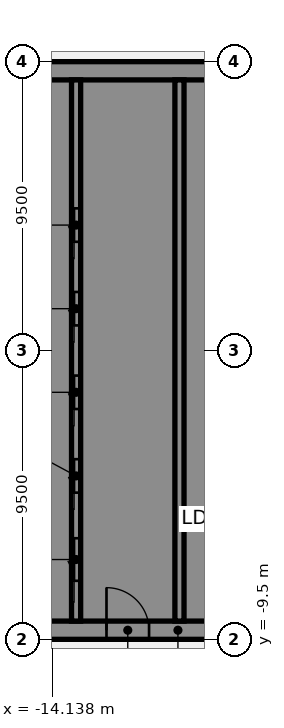
"""IFC4 building model, lengths in metres.
Left out: names, types, materials, properties, quantities, classifications, styles, units other than length and angle.
Written with IfcOpenShell. Run it as: python <this file> out.ifc"""

import sys

from ifc_helpers import new_model, si_unit, direction, frame, frame_2d, origin, place, context, subcontext, project, spatial, polyline, rectangle, outline, extrude, element, fill, save


model = new_model("IFC4")
c1 = context("Model", 3, precision=1e-05, world=origin(), true_north=direction((0.0, 1.0)))
c2 = subcontext(c1, "Body", "Model", "MODEL_VIEW")
j1 = project(units=[si_unit("LENGTHUNIT", "METRE"), si_unit("PLANEANGLEUNIT", "RADIAN")], contexts=[c1])
p1 = place(None, origin())
s1 = spatial("IfcSite", under=j1, at=p1, CompositionType="ELEMENT")
p2 = place(p1, origin())
s2 = spatial("IfcBuilding", under=s1, at=p2, CompositionType="ELEMENT")
p3 = place(p2, frame((0.0, 0.0, 106.0)))
s3 = spatial("IfcBuildingStorey", under=s2, at=p3, CompositionType="ELEMENT", Elevation=106.0)
p4 = place(p3, frame((-16.5, -9.2, 0.0), z_axis=(0.0, 0.0, 1.0), x_axis=(1.0, 0.0, 0.0)))
e1 = element("IfcWall", 1, at=p4, inside=s3, PredefinedType="SHEAR", context=c2, shape_type="SweptSolid", body=[
    extrude(rectangle(XDim=13.0, YDim=0.6, at=frame_2d((6.5, 0.0))), origin(), (0.0, 0.0, 1.0), 3.61),
])
p5 = place(p4, frame((4.15, 0.0, 0.0)))
e2 = element("IfcOpeningElement", 2, at=p5, cuts=e1, PredefinedType="OPENING", context=c2, shape_type="SweptSolid", body=[
    extrude(rectangle(XDim=1.4, YDim=2.1, at=frame_2d((0.7, 1.05))), frame((0.0, 0.31, 0.0), z_axis=(0.0, -1.0, 0.0), x_axis=(1.0, 0.0, 0.0)), (0.0, 0.0, 1.0), 0.62),
])
p6 = place(p4, frame((10.125, 0.0, 0.0)))
e3 = element("IfcOpeningElement", 3, at=p6, cuts=e1, PredefinedType="OPENING", context=c2, shape_type="SweptSolid", body=[
    extrude(rectangle(XDim=1.4, YDim=2.1, at=frame_2d((0.7, 1.05))), frame((0.0, 0.31, 0.0), z_axis=(0.0, -1.0, 0.0), x_axis=(1.0, 0.0, 0.0)), (0.0, 0.0, 1.0), 0.62),
])
p7 = place(p3, origin())
e4 = element("IfcWall", 4, at=p7, inside=s3, PredefinedType="SHEAR", context=c2, shape_type="SweptSolid", body=[
    extrude(outline(polyline([(-13.5, -8.9), (-13.5, -8.125), (-15.9, -8.125), (-15.9, -5.625), (-13.5, -5.625), (-13.5, -5.375), (-15.9, -5.375), (-15.9, -2.875), (-13.5, -2.875), (-13.5, -2.625), (-15.9, -2.625), (-15.9, -0.125), (-13.5, -0.125), (-13.5, 0.125), (-15.9, 0.125), (-15.9, 2.625), (-13.5, 2.625), (-13.5, 2.875), (-15.9, 2.875), (-15.9, 5.375), (-13.5, 5.375), (-13.5, 5.625), (-15.9, 5.625), (-15.9, 8.125), (-13.5, 8.125), (-13.5, 8.9), (-15.9, 8.9), (-16.5, 8.9), (-16.5, -8.9), (-15.9, -8.9), (-13.5, -8.9)])), origin(), (0.0, 0.0, 1.0), 3.61),
])
p8 = place(p3, frame((-16.5, 9.2, 0.0), z_axis=(0.0, 0.0, 1.0), x_axis=(1.0, 0.0, 0.0)))
e5 = element("IfcWall", 5, at=p8, inside=s3, PredefinedType="SHEAR", context=c2, shape_type="SweptSolid", body=[
    extrude(rectangle(XDim=13.0, YDim=0.6, at=frame_2d((6.5, 0.0))), origin(), (0.0, 0.0, 1.0), 3.61),
])
p9 = place(p3, origin())
e6 = element("IfcWall", 6, at=p9, inside=s3, PredefinedType="SHEAR", context=c2, shape_type="SweptSolid", body=[
    extrude(outline(polyline([(-9.8, -5.375), (-9.8, -5.625), (-7.5, -5.625), (-7.2, -5.625), (-7.2, 8.9), (-7.5, 8.9), (-9.8, 8.9), (-9.8, 8.125), (-7.5, 8.125), (-7.5, 5.625), (-9.8, 5.625), (-9.8, 5.375), (-7.5, 5.375), (-7.5, 2.875), (-9.8, 2.875), (-9.8, 2.625), (-7.5, 2.625), (-7.5, 0.125), (-9.8, 0.125), (-9.8, -0.125), (-7.5, -0.125), (-7.5, -2.625), (-9.8, -2.625), (-9.8, -2.875), (-7.5, -2.875), (-7.5, -5.375), (-9.8, -5.375)])), origin(), (0.0, 0.0, 1.0), 3.61),
])
p10 = place(p3, origin())
e7 = element("IfcWall", 7, at=p10, inside=s3, PredefinedType="SHEAR", context=c2, shape_type="SweptSolid", body=[
    extrude(outline(polyline([(-7.5, -8.125), (-9.55, -8.125), (-9.55, -5.625), (-9.8, -5.625), (-9.8, -8.125), (-9.8, -8.9), (-7.5, -8.9), (-7.5, -8.125)])), origin(), (0.0, 0.0, 1.0), 3.61),
])
p11 = place(p3, frame((-13.35, -8.9, 0.0), z_axis=(0.0, 0.0, 1.0), x_axis=(0.0, 1.0, 0.0)))
e8 = element("IfcWall", 8, at=p11, inside=s3, PredefinedType="SHEAR", context=c2, shape_type="SweptSolid", body=[
    extrude(rectangle(XDim=17.8, YDim=0.3, at=frame_2d((8.9, 0.0))), origin(), (0.0, 0.0, 1.0), 3.61),
])
p12 = place(p11, frame((1.325, 0.0, 0.0)))
e9 = element("IfcOpeningElement", 9, at=p12, cuts=e8, PredefinedType="OPENING", context=c2, shape_type="SweptSolid", body=[
    extrude(rectangle(XDim=1.4, YDim=2.1, at=frame_2d((0.7, 1.05))), frame((0.0, 0.16, 0.0), z_axis=(0.0, -1.0, 0.0), x_axis=(1.0, 0.0, 0.0)), (0.0, 0.0, 1.0), 0.32),
])
p13 = place(p11, frame((4.225, 0.0, 0.0)))
e10 = element("IfcOpeningElement", 10, at=p13, cuts=e8, PredefinedType="OPENING", context=c2, shape_type="SweptSolid", body=[
    extrude(rectangle(XDim=1.1, YDim=2.1, at=frame_2d((0.55, 1.05))), frame((0.0, 0.16, 0.0), z_axis=(0.0, -1.0, 0.0), x_axis=(1.0, 0.0, 0.0)), (0.0, 0.0, 1.0), 0.32),
])
p14 = place(p11, frame((6.975, 0.0, 0.0)))
e11 = element("IfcOpeningElement", 11, at=p14, cuts=e8, PredefinedType="OPENING", context=c2, shape_type="SweptSolid", body=[
    extrude(rectangle(XDim=1.1, YDim=2.1, at=frame_2d((0.55, 1.05))), frame((0.0, 0.16, 0.0), z_axis=(0.0, -1.0, 0.0), x_axis=(1.0, 0.0, 0.0)), (0.0, 0.0, 1.0), 0.32),
])
p15 = place(p11, frame((9.725, 0.0, 0.0)))
e12 = element("IfcOpeningElement", 12, at=p15, cuts=e8, PredefinedType="OPENING", context=c2, shape_type="SweptSolid", body=[
    extrude(rectangle(XDim=1.1, YDim=2.1, at=frame_2d((0.55, 1.05))), frame((0.0, 0.16, 0.0), z_axis=(0.0, -1.0, 0.0), x_axis=(1.0, 0.0, 0.0)), (0.0, 0.0, 1.0), 0.32),
])
p16 = place(p11, frame((12.475, 0.0, 0.0)))
e13 = element("IfcOpeningElement", 13, at=p16, cuts=e8, PredefinedType="OPENING", context=c2, shape_type="SweptSolid", body=[
    extrude(rectangle(XDim=1.1, YDim=2.1, at=frame_2d((0.55, 1.05))), frame((0.0, 0.16, 0.0), z_axis=(0.0, -1.0, 0.0), x_axis=(1.0, 0.0, 0.0)), (0.0, 0.0, 1.0), 0.32),
])
p17 = place(p3, frame((-9.95, -8.9, 0.0), z_axis=(0.0, 0.0, 1.0), x_axis=(0.0, 1.0, 0.0)))
e14 = element("IfcWall", 14, at=p17, inside=s3, PredefinedType="SHEAR", context=c2, shape_type="SweptSolid", body=[
    extrude(rectangle(XDim=17.8, YDim=0.3, at=frame_2d((8.9, 0.0))), origin(), (0.0, 0.0, 1.0), 3.61),
])
p18 = place(p5, origin())
e15 = element("IfcDoor", 15, at=p18, inside=s3, OperationType="SINGLE_SWING_LEFT", PredefinedType="DOOR", context=c2, shape_type="SweptSolid", body=[
    extrude(rectangle(XDim=1.4, YDim=2.1, at=frame_2d((0.7, 1.05))), frame((0.0, 0.025, 0.0), z_axis=(0.0, -1.0, 0.0), x_axis=(1.0, 0.0, 0.0)), (0.0, 0.0, 1.0), 0.05),
])
fill(e2, e15)
p19 = place(p12, origin())
e16 = element("IfcDoor", 16, at=p19, inside=s3, OperationType="SLIDING_TO_LEFT", PredefinedType="DOOR", context=c2, shape_type="SweptSolid", body=[
    extrude(rectangle(XDim=1.4, YDim=2.1, at=frame_2d((0.7, 1.05))), frame((0.0, 0.025, 0.0), z_axis=(0.0, -1.0, 0.0), x_axis=(1.0, 0.0, 0.0)), (0.0, 0.0, 1.0), 0.05),
])
fill(e9, e16)
p20 = place(p13, origin())
e17 = element("IfcDoor", 17, at=p20, inside=s3, OperationType="SLIDING_TO_LEFT", PredefinedType="DOOR", context=c2, shape_type="SweptSolid", body=[
    extrude(rectangle(XDim=1.1, YDim=2.1, at=frame_2d((0.55, 1.05))), frame((0.0, 0.025, 0.0), z_axis=(0.0, -1.0, 0.0), x_axis=(1.0, 0.0, 0.0)), (0.0, 0.0, 1.0), 0.05),
])
fill(e10, e17)
p21 = place(p14, origin())
e18 = element("IfcDoor", 18, at=p21, inside=s3, OperationType="SLIDING_TO_LEFT", PredefinedType="DOOR", context=c2, shape_type="SweptSolid", body=[
    extrude(rectangle(XDim=1.1, YDim=2.1, at=frame_2d((0.55, 1.05))), frame((0.0, 0.025, 0.0), z_axis=(0.0, -1.0, 0.0), x_axis=(1.0, 0.0, 0.0)), (0.0, 0.0, 1.0), 0.05),
])
fill(e11, e18)
p22 = place(p15, origin())
e19 = element("IfcDoor", 19, at=p22, inside=s3, OperationType="SLIDING_TO_LEFT", PredefinedType="DOOR", context=c2, shape_type="SweptSolid", body=[
    extrude(rectangle(XDim=1.1, YDim=2.1, at=frame_2d((0.55, 1.05))), frame((0.0, 0.025, 0.0), z_axis=(0.0, -1.0, 0.0), x_axis=(1.0, 0.0, 0.0)), (0.0, 0.0, 1.0), 0.05),
])
fill(e12, e19)
p23 = place(p16, origin())
e20 = element("IfcDoor", 20, at=p23, inside=s3, OperationType="SLIDING_TO_LEFT", PredefinedType="DOOR", context=c2, shape_type="SweptSolid", body=[
    extrude(rectangle(XDim=1.1, YDim=2.1, at=frame_2d((0.55, 1.05))), frame((0.0, 0.025, 0.0), z_axis=(0.0, -1.0, 0.0), x_axis=(1.0, 0.0, 0.0)), (0.0, 0.0, 1.0), 0.05),
])
fill(e13, e20)
save(model, sys.argv[1])
